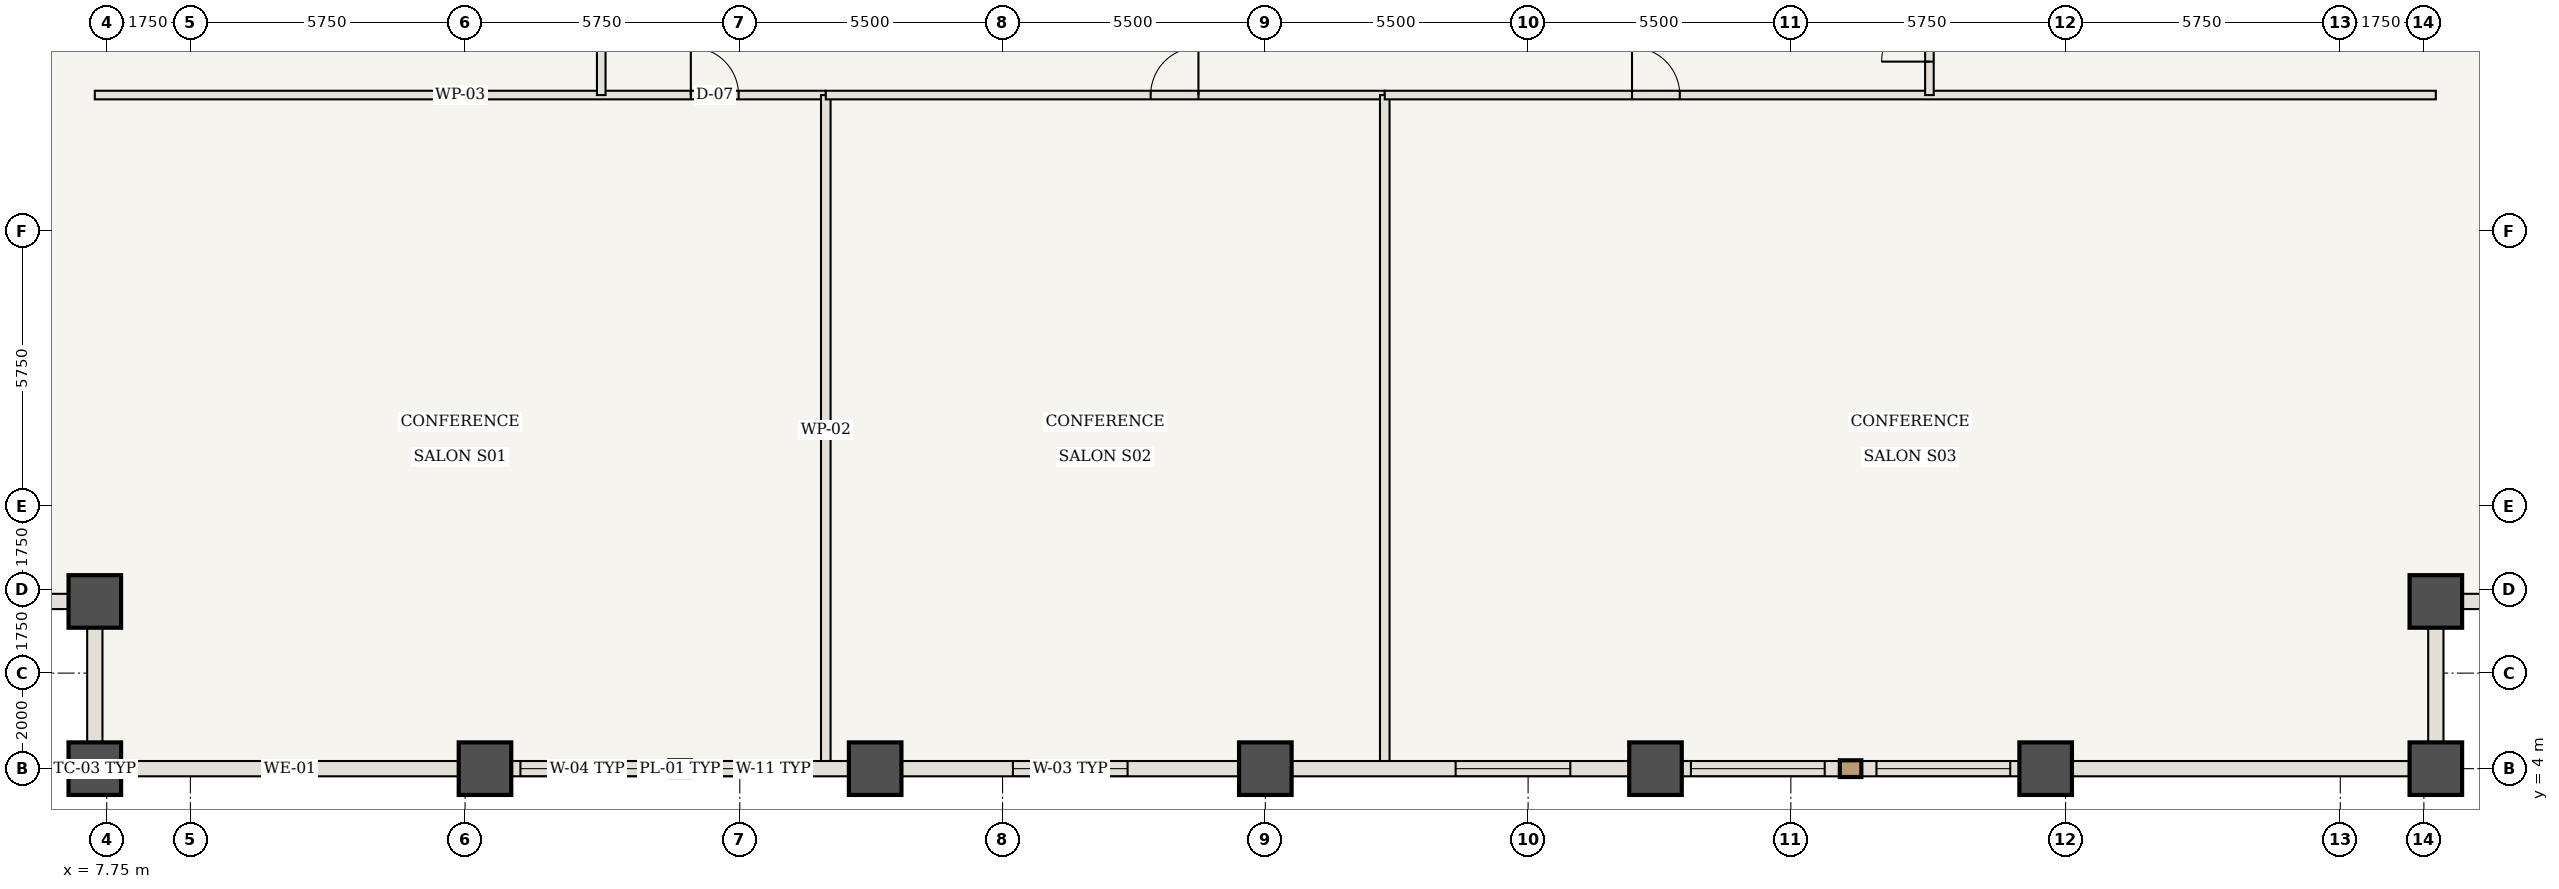
"""IFC4 building model, lengths in metres.
Left out: names, types, materials, properties, quantities, classifications, styles, units other than length and angle.
Written with IfcOpenShell. Run it as: python <this file> out.ifc"""

import sys

from ifc_helpers import new_model, si_unit, direction, frame, frame_2d, origin, origin_2d, place, context, subcontext, project, spatial, rectangle, extrude, element, fill, save


model = new_model("IFC4")
c1 = context("Model", 3, precision=1e-05, world=origin(), true_north=direction((0.0, 1.0)))
c2 = subcontext(c1, "Body", "Model", "MODEL_VIEW")
j1 = project(units=[si_unit("LENGTHUNIT", "METRE"), si_unit("PLANEANGLEUNIT", "RADIAN")], contexts=[c1])
p1 = place(None, origin())
s1 = spatial("IfcSite", under=j1, at=p1, CompositionType="ELEMENT")
p2 = place(p1, origin())
s2 = spatial("IfcBuilding", under=s1, at=p2, CompositionType="ELEMENT")
p3 = place(p2, frame((0.0, 0.0, 49.35)))
s3 = spatial("IfcBuildingStorey", under=s2, at=p3, CompositionType="ELEMENT", Elevation=49.35)
for number, where, z_axis, x_axis in (
    (1, (7.5, 4.0, 0.0), (0.0, 0.0, 1.0), (1.0, 0.0, 0.0)),
    (2, (7.5, 7.5, 0.0), (0.0, 0.0, 1.0), (1.0, 0.0, 0.0)),
    (3, (56.5, 4.0, 0.0), (0.0, 0.0, 1.0), (1.0, 0.0, 0.0)),
    (4, (56.5, 7.5, 0.0), (0.0, 0.0, 1.0), (1.0, 0.0, 0.0)),
    (5, (15.667, 4.0, 0.0), (0.0, 0.0, 1.0), (1.0, 0.0, 0.0)),
    (6, (23.833, 4.0, 0.0), (0.0, 0.0, 1.0), (1.0, 0.0, 0.0)),
    (7, (32.0, 4.0, 0.0), (0.0, 0.0, 1.0), (1.0, 0.0, 0.0)),
    (8, (40.167, 4.0, 0.0), (0.0, 0.0, 1.0), (1.0, 0.0, 0.0)),
    (9, (48.333, 4.0, 0.0), (0.0, 0.0, 1.0), (1.0, 0.0, 0.0)),
):
    element("IfcColumn", number, at=place(p3, frame(where, z_axis=z_axis, x_axis=x_axis)), inside=s3, PredefinedType="COLUMN", context=c2, shape_type="SweptSolid", body=[
        extrude(rectangle(XDim=1.1, YDim=1.1, at=origin_2d()), origin(), (0.0, 0.0, 1.0), 3.5),
    ])
p4 = place(p3, frame((7.5, 18.1, 0.0), z_axis=(0.0, 0.0, 1.0), x_axis=(1.0, 0.0, 0.0)))
e10 = element("IfcWall", 10, at=p4, inside=s3, PredefinedType="STANDARD", context=c2, shape_type="SweptSolid", body=[
    extrude(rectangle(XDim=15.3, YDim=0.18, at=frame_2d((7.65, 0.0))), origin(), (0.0, 0.0, 1.0), 3.32),
])
p5 = place(p4, frame((12.475, 0.0, 0.0)))
e11 = element("IfcOpeningElement", 11, at=p5, cuts=e10, PredefinedType="OPENING", context=c2, shape_type="SweptSolid", body=[
    extrude(rectangle(XDim=1.0, YDim=2.15, at=frame_2d((0.5, 1.075))), frame((0.0, 0.1, 0.0), z_axis=(0.0, -1.0, 0.0), x_axis=(1.0, 0.0, 0.0)), (0.0, 0.0, 1.0), 0.2),
])
p6 = place(p3, frame((22.8, 4.06, 0.0), z_axis=(0.0, 0.0, 1.0), x_axis=(0.0, 1.0, 0.0)))
e12 = element("IfcWall", 12, at=p6, inside=s3, PredefinedType="STANDARD", context=c2, shape_type="SweptSolid", body=[
    extrude(rectangle(XDim=14.04, YDim=0.2, at=frame_2d((7.02, 0.0))), origin(), (0.0, 0.0, 1.0), 3.32),
])
p7 = place(p3, frame((22.8, 18.1, 0.0), z_axis=(0.0, 0.0, 1.0), x_axis=(1.0, 0.0, 0.0)))
e13 = element("IfcWall", 13, at=p7, inside=s3, PredefinedType="STANDARD", context=c2, shape_type="SweptSolid", body=[
    extrude(rectangle(XDim=11.7, YDim=0.18, at=frame_2d((5.85, 0.0))), origin(), (0.0, 0.0, 1.0), 3.32),
])
p8 = place(p7, frame((6.8, 0.0, 0.0)))
e14 = element("IfcOpeningElement", 14, at=p8, cuts=e13, PredefinedType="OPENING", context=c2, shape_type="SweptSolid", body=[
    extrude(rectangle(XDim=1.0, YDim=2.15, at=frame_2d((0.5, 1.075))), frame((0.0, 0.1, 0.0), z_axis=(0.0, -1.0, 0.0), x_axis=(1.0, 0.0, 0.0)), (0.0, 0.0, 1.0), 0.2),
])
p9 = place(p3, frame((34.5, 4.06, 0.0), z_axis=(0.0, 0.0, 1.0), x_axis=(0.0, 1.0, 0.0)))
e15 = element("IfcWall", 15, at=p9, inside=s3, PredefinedType="STANDARD", context=c2, shape_type="SweptSolid", body=[
    extrude(rectangle(XDim=14.04, YDim=0.2, at=frame_2d((7.02, 0.0))), origin(), (0.0, 0.0, 1.0), 3.32),
])
p10 = place(p3, frame((34.5, 18.1, 0.0), z_axis=(0.0, 0.0, 1.0), x_axis=(1.0, 0.0, 0.0)))
e16 = element("IfcWall", 16, at=p10, inside=s3, PredefinedType="STANDARD", context=c2, shape_type="SweptSolid", body=[
    extrude(rectangle(XDim=22.0, YDim=0.18, at=frame_2d((11.0, 0.0))), origin(), (0.0, 0.0, 1.0), 3.32),
])
p11 = place(p10, frame((5.175, 0.0, 0.0)))
e17 = element("IfcOpeningElement", 17, at=p11, cuts=e16, PredefinedType="OPENING", context=c2, shape_type="SweptSolid", body=[
    extrude(rectangle(XDim=1.0, YDim=2.15, at=frame_2d((0.5, 1.075))), frame((0.0, 0.1, 0.0), z_axis=(0.0, -1.0, 0.0), x_axis=(1.0, 0.0, 0.0)), (0.0, 0.0, 1.0), 0.2),
])
p12 = place(p3, frame((18.1, 18.1, 0.0), z_axis=(0.0, 0.0, 1.0), x_axis=(0.0, 1.0, 0.0)))
e18 = element("IfcWall", 18, at=p12, inside=s3, PredefinedType="STANDARD", context=c2, shape_type="SweptSolid", body=[
    extrude(rectangle(XDim=10.9, YDim=0.18, at=frame_2d((5.45, 0.0))), origin(), (0.0, 0.0, 1.0), 3.32),
])
p13 = place(p12, frame((4.95, 0.0, 0.0)))
e19 = element("IfcOpeningElement", 19, at=p13, cuts=e18, PredefinedType="OPENING", context=c2, shape_type="SweptSolid", body=[
    extrude(rectangle(XDim=1.0, YDim=2.15, at=frame_2d((0.5, 1.075))), frame((0.0, 0.1, 0.0), z_axis=(0.0, -1.0, 0.0), x_axis=(1.0, 0.0, 0.0)), (0.0, 0.0, 1.0), 0.2),
])
p14 = place(p3, frame((45.9, 18.1, 0.0), z_axis=(0.0, 0.0, 1.0), x_axis=(0.0, 1.0, 0.0)))
e20 = element("IfcWall", 20, at=p14, inside=s3, PredefinedType="STANDARD", context=c2, shape_type="SweptSolid", body=[
    extrude(rectangle(XDim=5.3, YDim=0.18, at=frame_2d((2.65, 0.0))), origin(), (0.0, 0.0, 1.0), 3.32),
])
p15 = place(p14, frame((0.7, 0.0, 0.0)))
e21 = element("IfcOpeningElement", 21, at=p15, cuts=e20, PredefinedType="OPENING", context=c2, shape_type="SweptSolid", body=[
    extrude(rectangle(XDim=1.0, YDim=2.15, at=frame_2d((0.5, 1.075))), frame((0.0, 0.1, 0.0), z_axis=(0.0, -1.0, 0.0), x_axis=(1.0, 0.0, 0.0)), (0.0, 0.0, 1.0), 0.2),
])
p16 = place(p3, frame((15.667, 4.0, 0.0), z_axis=(0.0, 0.0, 1.0), x_axis=(-1.0, 0.0, 0.0)))
e22 = element("IfcWall", 22, at=p16, inside=s3, PredefinedType="USERDEFINED", context=c2, shape_type="SweptSolid", body=[
    extrude(rectangle(XDim=8.167, YDim=0.32, at=frame_2d((4.083, 0.0))), origin(), (0.0, 0.0, 1.0), 2.52),
])
p17 = place(p3, frame((23.833, 4.0, 0.0), z_axis=(0.0, 0.0, 1.0), x_axis=(-1.0, 0.0, 0.0)))
e23 = element("IfcWall", 23, at=p17, inside=s3, PredefinedType="USERDEFINED", context=c2, shape_type="SweptSolid", body=[
    extrude(rectangle(XDim=8.167, YDim=0.32, at=frame_2d((4.083, 0.0))), origin(), (0.0, 0.0, 1.0), 2.52),
])
p18 = place(p17, frame((1.708, 0.0, 0.85)))
e24 = element("IfcOpeningElement", 24, at=p18, cuts=e23, PredefinedType="OPENING", context=c2, shape_type="SweptSolid", body=[
    extrude(rectangle(XDim=1.6, YDim=1.47, at=frame_2d((0.8, 0.735))), frame((0.0, 0.17, 0.0), z_axis=(0.0, -1.0, 0.0), x_axis=(1.0, 0.0, 0.0)), (0.0, 0.0, 1.0), 0.34),
])
p19 = place(p17, frame((4.625, 0.0, 0.85)))
e25 = element("IfcOpeningElement", 25, at=p19, cuts=e23, PredefinedType="OPENING", context=c2, shape_type="SweptSolid", body=[
    extrude(rectangle(XDim=2.8, YDim=1.47, at=frame_2d((1.4, 0.735))), frame((0.0, 0.17, 0.0), z_axis=(0.0, -1.0, 0.0), x_axis=(1.0, 0.0, 0.0)), (0.0, 0.0, 1.0), 0.34),
])
p20 = place(p3, frame((32.0, 4.0, 0.0), z_axis=(0.0, 0.0, 1.0), x_axis=(-1.0, 0.0, 0.0)))
e26 = element("IfcWall", 26, at=p20, inside=s3, PredefinedType="USERDEFINED", context=c2, shape_type="SweptSolid", body=[
    extrude(rectangle(XDim=8.167, YDim=0.32, at=frame_2d((4.083, 0.0))), origin(), (0.0, 0.0, 1.0), 2.52),
])
p21 = place(p20, frame((2.883, 0.0, 0.85)))
e27 = element("IfcOpeningElement", 27, at=p21, cuts=e26, PredefinedType="OPENING", context=c2, shape_type="SweptSolid", body=[
    extrude(rectangle(XDim=2.4, YDim=1.47, at=frame_2d((1.2, 0.735))), frame((0.0, 0.17, 0.0), z_axis=(0.0, -1.0, 0.0), x_axis=(1.0, 0.0, 0.0)), (0.0, 0.0, 1.0), 0.34),
])
p22 = place(p3, frame((40.167, 4.0, 0.0), z_axis=(0.0, 0.0, 1.0), x_axis=(-1.0, 0.0, 0.0)))
e28 = element("IfcWall", 28, at=p22, inside=s3, PredefinedType="USERDEFINED", context=c2, shape_type="SweptSolid", body=[
    extrude(rectangle(XDim=8.167, YDim=0.32, at=frame_2d((4.083, 0.0))), origin(), (0.0, 0.0, 1.0), 2.52),
])
p23 = place(p22, frame((1.783, 0.0, 0.85)))
e29 = element("IfcOpeningElement", 29, at=p23, cuts=e28, PredefinedType="OPENING", context=c2, shape_type="SweptSolid", body=[
    extrude(rectangle(XDim=2.4, YDim=1.47, at=frame_2d((1.2, 0.735))), frame((0.0, 0.17, 0.0), z_axis=(0.0, -1.0, 0.0), x_axis=(1.0, 0.0, 0.0)), (0.0, 0.0, 1.0), 0.34),
])
p24 = place(p3, frame((48.333, 4.0, 0.0), z_axis=(0.0, 0.0, 1.0), x_axis=(-1.0, 0.0, 0.0)))
e30 = element("IfcWall", 30, at=p24, inside=s3, PredefinedType="USERDEFINED", context=c2, shape_type="SweptSolid", body=[
    extrude(rectangle(XDim=8.167, YDim=0.32, at=frame_2d((4.083, 0.0))), origin(), (0.0, 0.0, 1.0), 2.52),
])
p25 = place(p24, frame((0.742, 0.0, 0.85)))
e31 = element("IfcOpeningElement", 31, at=p25, cuts=e30, PredefinedType="OPENING", context=c2, shape_type="SweptSolid", body=[
    extrude(rectangle(XDim=2.8, YDim=1.47, at=frame_2d((1.4, 0.735))), frame((0.0, 0.17, 0.0), z_axis=(0.0, -1.0, 0.0), x_axis=(1.0, 0.0, 0.0)), (0.0, 0.0, 1.0), 0.34),
])
p26 = place(p24, frame((4.625, 0.0, 0.85)))
e32 = element("IfcOpeningElement", 32, at=p26, cuts=e30, PredefinedType="OPENING", context=c2, shape_type="SweptSolid", body=[
    extrude(rectangle(XDim=2.8, YDim=1.47, at=frame_2d((1.4, 0.735))), frame((0.0, 0.17, 0.0), z_axis=(0.0, -1.0, 0.0), x_axis=(1.0, 0.0, 0.0)), (0.0, 0.0, 1.0), 0.34),
])
p27 = place(p3, frame((56.5, 4.0, 0.0), z_axis=(0.0, 0.0, 1.0), x_axis=(-1.0, 0.0, 0.0)))
e33 = element("IfcWall", 33, at=p27, inside=s3, PredefinedType="USERDEFINED", context=c2, shape_type="SweptSolid", body=[
    extrude(rectangle(XDim=8.167, YDim=0.32, at=frame_2d((4.083, 0.0))), origin(), (0.0, 0.0, 1.0), 2.52),
])
for number, where, z_axis, x_axis in (
    (34, (7.5, 4.0, 0.0), (0.0, 0.0, 1.0), (0.0, 1.0, 0.0)),
    (35, (7.5, 7.5, 0.0), (0.0, 0.0, 1.0), (-1.0, 0.0, 0.0)),
    (36, (56.5, 7.5, 0.0), (0.0, 0.0, 1.0), (0.0, -1.0, 0.0)),
    (37, (60.0, 7.5, 0.0), (0.0, 0.0, 1.0), (-1.0, 0.0, 0.0)),
):
    element("IfcWall", number, at=place(p3, frame(where, z_axis=z_axis, x_axis=x_axis)), inside=s3, PredefinedType="USERDEFINED", context=c2, shape_type="SweptSolid", body=[
        extrude(rectangle(XDim=3.5, YDim=0.32, at=frame_2d((1.75, 0.0))), origin(), (0.0, 0.0, 1.0), 2.52),
    ])
p28 = place(p5, origin())
e38 = element("IfcDoor", 38, at=p28, inside=s3, OperationType="SINGLE_SWING_LEFT", PredefinedType="DOOR", context=c2, shape_type="SweptSolid", body=[
    extrude(rectangle(XDim=1.0, YDim=2.15, at=frame_2d((0.5, 1.075))), frame((0.0, 0.025, 0.0), z_axis=(0.0, -1.0, 0.0), x_axis=(1.0, 0.0, 0.0)), (0.0, 0.0, 1.0), 0.05),
])
fill(e11, e38)
p29 = place(p8, origin())
e39 = element("IfcDoor", 39, at=p29, inside=s3, OperationType="SINGLE_SWING_RIGHT", PredefinedType="DOOR", context=c2, shape_type="SweptSolid", body=[
    extrude(rectangle(XDim=1.0, YDim=2.15, at=frame_2d((0.5, 1.075))), frame((0.0, 0.025, 0.0), z_axis=(0.0, -1.0, 0.0), x_axis=(1.0, 0.0, 0.0)), (0.0, 0.0, 1.0), 0.05),
])
fill(e14, e39)
p30 = place(p11, origin())
e40 = element("IfcDoor", 40, at=p30, inside=s3, OperationType="SINGLE_SWING_LEFT", PredefinedType="DOOR", context=c2, shape_type="SweptSolid", body=[
    extrude(rectangle(XDim=1.0, YDim=2.15, at=frame_2d((0.5, 1.075))), frame((0.0, 0.025, 0.0), z_axis=(0.0, -1.0, 0.0), x_axis=(1.0, 0.0, 0.0)), (0.0, 0.0, 1.0), 0.05),
])
fill(e17, e40)
p31 = place(p15, origin())
e41 = element("IfcDoor", 41, at=p31, inside=s3, OperationType="SINGLE_SWING_LEFT", PredefinedType="DOOR", context=c2, shape_type="SweptSolid", body=[
    extrude(rectangle(XDim=1.0, YDim=2.15, at=frame_2d((0.5, 1.075))), frame((0.0, 0.025, 0.0), z_axis=(0.0, -1.0, 0.0), x_axis=(1.0, 0.0, 0.0)), (0.0, 0.0, 1.0), 0.05),
])
fill(e21, e41)
p32 = place(p18, origin())
e42 = element("IfcWindow", 42, at=p32, inside=s3, PartitioningType="SINGLE_PANEL", PredefinedType="WINDOW", context=c2, shape_type="SweptSolid", body=[
    extrude(rectangle(XDim=1.6, YDim=1.47, at=frame_2d((0.8, 0.735))), frame((0.0, 0.03, 0.0), z_axis=(0.0, -1.0, 0.0), x_axis=(1.0, 0.0, 0.0)), (0.0, 0.0, 1.0), 0.06),
])
fill(e24, e42)
p33 = place(p19, origin())
e43 = element("IfcWindow", 43, at=p33, inside=s3, PartitioningType="SINGLE_PANEL", PredefinedType="WINDOW", context=c2, shape_type="SweptSolid", body=[
    extrude(rectangle(XDim=2.8, YDim=1.47, at=frame_2d((1.4, 0.735))), frame((0.0, 0.03, 0.0), z_axis=(0.0, -1.0, 0.0), x_axis=(1.0, 0.0, 0.0)), (0.0, 0.0, 1.0), 0.06),
])
fill(e25, e43)
p34 = place(p21, origin())
e44 = element("IfcWindow", 44, at=p34, inside=s3, PartitioningType="SINGLE_PANEL", PredefinedType="WINDOW", context=c2, shape_type="SweptSolid", body=[
    extrude(rectangle(XDim=2.4, YDim=1.47, at=frame_2d((1.2, 0.735))), frame((0.0, 0.03, 0.0), z_axis=(0.0, -1.0, 0.0), x_axis=(1.0, 0.0, 0.0)), (0.0, 0.0, 1.0), 0.06),
])
fill(e27, e44)
p35 = place(p23, origin())
e45 = element("IfcWindow", 45, at=p35, inside=s3, PartitioningType="SINGLE_PANEL", PredefinedType="WINDOW", context=c2, shape_type="SweptSolid", body=[
    extrude(rectangle(XDim=2.4, YDim=1.47, at=frame_2d((1.2, 0.735))), frame((0.0, 0.03, 0.0), z_axis=(0.0, -1.0, 0.0), x_axis=(1.0, 0.0, 0.0)), (0.0, 0.0, 1.0), 0.06),
])
fill(e29, e45)
p36 = place(p25, origin())
e46 = element("IfcWindow", 46, at=p36, inside=s3, PartitioningType="SINGLE_PANEL", PredefinedType="WINDOW", context=c2, shape_type="SweptSolid", body=[
    extrude(rectangle(XDim=2.8, YDim=1.47, at=frame_2d((1.4, 0.735))), frame((0.0, 0.03, 0.0), z_axis=(0.0, -1.0, 0.0), x_axis=(1.0, 0.0, 0.0)), (0.0, 0.0, 1.0), 0.06),
])
fill(e31, e46)
p37 = place(p26, origin())
e47 = element("IfcWindow", 47, at=p37, inside=s3, PartitioningType="SINGLE_PANEL", PredefinedType="WINDOW", context=c2, shape_type="SweptSolid", body=[
    extrude(rectangle(XDim=2.8, YDim=1.47, at=frame_2d((1.4, 0.735))), frame((0.0, 0.03, 0.0), z_axis=(0.0, -1.0, 0.0), x_axis=(1.0, 0.0, 0.0)), (0.0, 0.0, 1.0), 0.06),
])
fill(e32, e47)
save(model, sys.argv[1])
